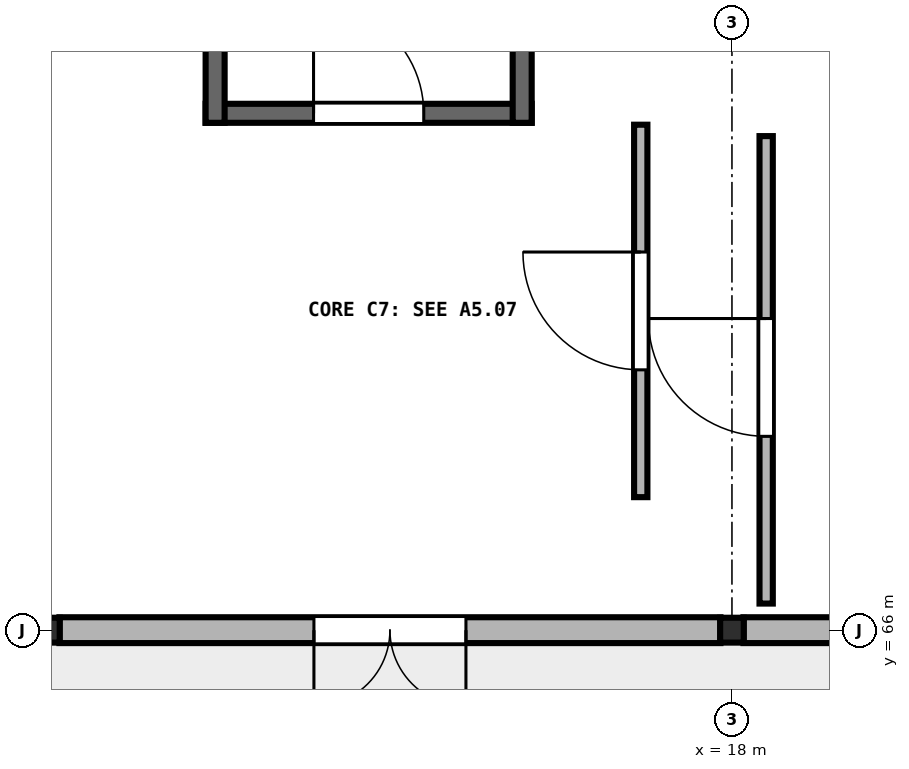
"""IFC4 building model, lengths in metres.
Left out: names, types, materials, properties, quantities, classifications, styles, units other than length and angle.
Written with IfcOpenShell. Run it as: python <this file> out.ifc"""

import sys

from ifc_helpers import new_model, si_unit, direction, frame, frame_2d, origin, origin_2d, place, context, subcontext, project, spatial, rectangle, i_section, extrude, element, fill, save


model = new_model("IFC4")
c1 = context("Model", 3, precision=1e-05, world=origin(), true_north=direction((0.0, 1.0)))
c2 = subcontext(c1, "Body", "Model", "MODEL_VIEW")
j1 = project(units=[si_unit("LENGTHUNIT", "METRE"), si_unit("PLANEANGLEUNIT", "RADIAN")], contexts=[c1])
p1 = place(None, origin())
s1 = spatial("IfcSite", under=j1, at=p1, CompositionType="ELEMENT")
p2 = place(p1, origin())
s2 = spatial("IfcBuilding", under=s1, at=p2, CompositionType="ELEMENT")
p3 = place(p2, origin())
s3 = spatial("IfcBuildingStorey", under=s2, at=p3, CompositionType="ELEMENT", Elevation=0.0)
for number, where, z_axis, x_axis in (
    (1, (9.0, 66.0, 0.0), (0.0, 0.0, 1.0), (1.0, 0.0, 0.0)),
    (2, (18.0, 66.0, 0.0), (0.0, 0.0, 1.0), (1.0, 0.0, 0.0)),
):
    element("IfcColumn", number, at=place(p3, frame(where, z_axis=z_axis, x_axis=x_axis)), inside=s3, PredefinedType="COLUMN", context=c2, shape_type="SweptSolid", body=[
        extrude(i_section(OverallWidth=0.311, OverallDepth=0.327, WebThickness=0.016, FlangeThickness=0.025, FilletRadius=0.017, at=origin_2d()), origin(), (0.0, 0.0, 1.0), 5.12),
    ])
p4 = place(p3, frame((17.848, 66.0, 0.0), z_axis=(0.0, 0.0, 1.0), x_axis=(-1.0, 0.0, 0.0)))
e3 = element("IfcWall", 3, at=p4, inside=s3, PredefinedType="SOLIDWALL", context=c2, shape_type="SweptSolid", body=[
    extrude(rectangle(XDim=8.697, YDim=0.34, at=frame_2d((4.348, 0.0))), origin(), (0.0, 0.0, 1.0), 4.557),
])
p5 = place(p4, frame((3.348, 0.0, 0.0)))
e4 = element("IfcOpeningElement", 4, at=p5, cuts=e3, PredefinedType="OPENING", context=c2, shape_type="SweptSolid", body=[
    extrude(rectangle(XDim=2.0, YDim=2.3, at=frame_2d((1.0, 1.15))), frame((0.0, 0.18, 0.0), z_axis=(0.0, -1.0, 0.0), x_axis=(1.0, 0.0, 0.0)), (0.0, 0.0, 1.0), 0.36),
])
p6 = place(p3, frame((18.152, 66.0, 0.0), z_axis=(0.0, 0.0, 1.0), x_axis=(1.0, 0.0, 0.0)))
e5 = element("IfcWall", 5, at=p6, inside=s3, PredefinedType="SOLIDWALL", context=c2, shape_type="SweptSolid", body=[
    extrude(rectangle(XDim=8.697, YDim=0.34, at=frame_2d((4.348, 0.0))), origin(), (0.0, 0.0, 1.0), 4.483),
])
p7 = place(p6, frame((2.274, 0.0, 1.05)))
e6 = element("IfcOpeningElement", 6, at=p7, cuts=e5, PredefinedType="OPENING", context=c2, shape_type="SweptSolid", body=[
    extrude(rectangle(XDim=1.25, YDim=2.05, at=frame_2d((0.625, 1.025))), frame((0.0, 0.18, 0.0), z_axis=(0.0, -1.0, 0.0), x_axis=(1.0, 0.0, 0.0)), (0.0, 0.0, 1.0), 0.36),
])
p8 = place(p6, frame((5.173, 0.0, 1.05)))
e7 = element("IfcOpeningElement", 7, at=p8, cuts=e5, PredefinedType="OPENING", context=c2, shape_type="SweptSolid", body=[
    extrude(rectangle(XDim=1.25, YDim=2.05, at=frame_2d((0.625, 1.025))), frame((0.0, 0.18, 0.0), z_axis=(0.0, -1.0, 0.0), x_axis=(1.0, 0.0, 0.0)), (0.0, 0.0, 1.0), 0.36),
])
p9 = place(p3, frame((11.075, 72.8, 0.0), z_axis=(0.0, 0.0, 1.0), x_axis=(1.0, 0.0, 0.0)))
e8 = element("IfcWall", 8, at=p9, inside=s3, PredefinedType="SHEAR", context=c2, shape_type="SweptSolid", body=[
    extrude(rectangle(XDim=4.29, YDim=0.25, at=frame_2d((2.145, 0.0))), origin(), (0.0, 0.0, 1.0), 5.12),
])
p10 = place(p9, frame((1.42, 0.0, 0.0)))
e9 = element("IfcOpeningElement", 9, at=p10, cuts=e8, PredefinedType="OPENING", context=c2, shape_type="SweptSolid", body=[
    extrude(rectangle(XDim=1.45, YDim=2.2, at=frame_2d((0.725, 1.1))), frame((0.0, 0.135, 0.0), z_axis=(0.0, -1.0, 0.0), x_axis=(1.0, 0.0, 0.0)), (0.0, 0.0, 1.0), 0.27),
])
for number, where, z_axis, x_axis in (
    (10, (11.2, 72.675, 0.0), (0.0, 0.0, 1.0), (0.0, 1.0, 0.0)),
    (11, (15.24, 72.675, 0.0), (0.0, 0.0, 1.0), (0.0, 1.0, 0.0)),
):
    element("IfcWall", number, at=place(p3, frame(where, z_axis=z_axis, x_axis=x_axis)), inside=s3, PredefinedType="SHEAR", context=c2, shape_type="SweptSolid", body=[
        extrude(rectangle(XDim=11.09, YDim=0.25, at=frame_2d((5.545, 0.0))), origin(), (0.0, 0.0, 1.0), 5.12),
    ])
p11 = place(p3, frame((16.8, 67.75, 0.0), z_axis=(0.0, 0.0, 1.0), x_axis=(0.0, 1.0, 0.0)))
e12 = element("IfcWall", 12, at=p11, inside=s3, PredefinedType="PARTITIONING", context=c2, shape_type="SweptSolid", body=[
    extrude(rectangle(XDim=4.9, YDim=0.175, at=frame_2d((2.45, 0.0))), origin(), (0.0, 0.0, 1.0), 5.07),
])
p12 = place(p11, frame((1.675, 0.0, 0.0)))
e13 = element("IfcOpeningElement", 13, at=p12, cuts=e12, PredefinedType="OPENING", context=c2, shape_type="SweptSolid", body=[
    extrude(rectangle(XDim=1.55, YDim=2.22, at=frame_2d((0.775, 1.11))), frame((0.0, 0.097, 0.0), z_axis=(0.0, -1.0, 0.0), x_axis=(1.0, 0.0, 0.0)), (0.0, 0.0, 1.0), 0.195),
])
p13 = place(p3, frame((18.45, 66.35, 0.0), z_axis=(0.0, 0.0, 1.0), x_axis=(0.0, 1.0, 0.0)))
e14 = element("IfcWall", 14, at=p13, inside=s3, PredefinedType="PARTITIONING", context=c2, shape_type="SweptSolid", body=[
    extrude(rectangle(XDim=6.15, YDim=0.175, at=frame_2d((3.075, 0.0))), origin(), (0.0, 0.0, 1.0), 4.488),
])
p14 = place(p13, frame((2.2, 0.0, 0.0)))
e15 = element("IfcOpeningElement", 15, at=p14, cuts=e14, PredefinedType="OPENING", context=c2, shape_type="SweptSolid", body=[
    extrude(rectangle(XDim=1.55, YDim=2.22, at=frame_2d((0.775, 1.11))), frame((0.0, 0.097, 0.0), z_axis=(0.0, -1.0, 0.0), x_axis=(1.0, 0.0, 0.0)), (0.0, 0.0, 1.0), 0.195),
])
p15 = place(p5, origin())
e16 = element("IfcDoor", 16, at=p15, inside=s3, OperationType="DOUBLE_DOOR_SINGLE_SWING", PredefinedType="DOOR", context=c2, shape_type="SweptSolid", body=[
    extrude(rectangle(XDim=2.0, YDim=2.3, at=frame_2d((1.0, 1.15))), frame((0.0, 0.025, 0.0), z_axis=(0.0, -1.0, 0.0), x_axis=(1.0, 0.0, 0.0)), (0.0, 0.0, 1.0), 0.05),
])
fill(e4, e16)
p16 = place(p10, origin())
e17 = element("IfcDoor", 17, at=p16, inside=s3, OperationType="SINGLE_SWING_LEFT", PredefinedType="DOOR", context=c2, shape_type="SweptSolid", body=[
    extrude(rectangle(XDim=1.45, YDim=2.2, at=frame_2d((0.725, 1.1))), frame((0.0, 0.025, 0.0), z_axis=(0.0, -1.0, 0.0), x_axis=(1.0, 0.0, 0.0)), (0.0, 0.0, 1.0), 0.05),
])
fill(e9, e17)
p17 = place(p12, origin())
e18 = element("IfcDoor", 18, at=p17, inside=s3, OperationType="SINGLE_SWING_RIGHT", PredefinedType="DOOR", context=c2, shape_type="SweptSolid", body=[
    extrude(rectangle(XDim=1.55, YDim=2.22, at=frame_2d((0.775, 1.11))), frame((0.0, 0.025, 0.0), z_axis=(0.0, -1.0, 0.0), x_axis=(1.0, 0.0, 0.0)), (0.0, 0.0, 1.0), 0.05),
])
fill(e13, e18)
p18 = place(p14, origin())
e19 = element("IfcDoor", 19, at=p18, inside=s3, OperationType="SINGLE_SWING_RIGHT", PredefinedType="DOOR", context=c2, shape_type="SweptSolid", body=[
    extrude(rectangle(XDim=1.55, YDim=2.22, at=frame_2d((0.775, 1.11))), frame((0.0, 0.025, 0.0), z_axis=(0.0, -1.0, 0.0), x_axis=(1.0, 0.0, 0.0)), (0.0, 0.0, 1.0), 0.05),
])
fill(e15, e19)
save(model, sys.argv[1])
